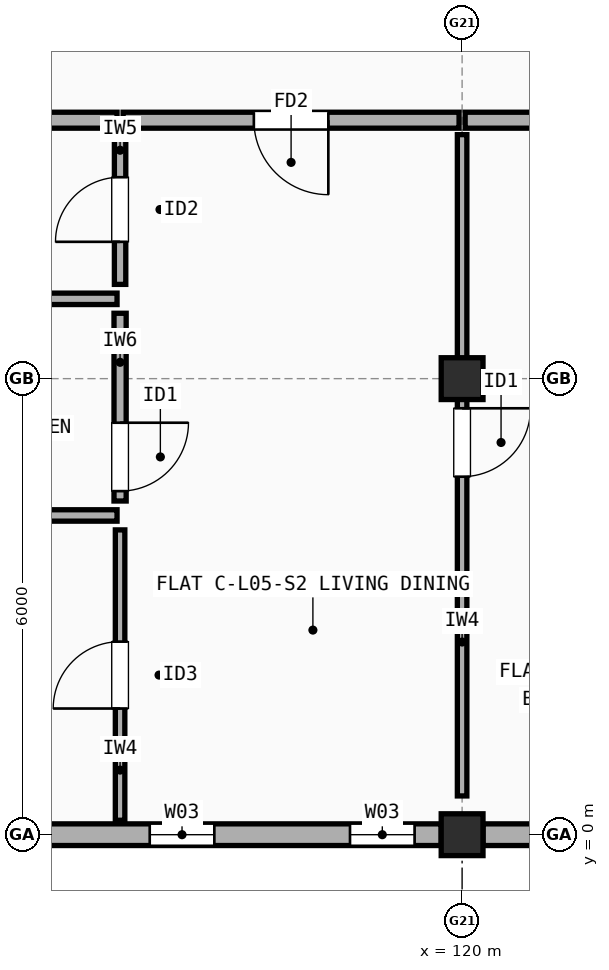
"""IFC4 building model, lengths in metres.
Left out: names, types, materials, properties, quantities, classifications, styles, units other than length and angle.
Written with IfcOpenShell. Run it as: python <this file> out.ifc"""

import sys

from ifc_helpers import new_model, si_unit, direction, frame, frame_2d, origin, origin_2d, place, context, subcontext, project, spatial, rectangle, extrude, element, fill, save


model = new_model("IFC4")
c1 = context("Model", 3, precision=1e-05, world=origin(), true_north=direction((0.0, 1.0)))
c2 = subcontext(c1, "Body", "Model", "MODEL_VIEW")
j1 = project(units=[si_unit("LENGTHUNIT", "METRE"), si_unit("PLANEANGLEUNIT", "RADIAN")], contexts=[c1])
p1 = place(None, origin())
s1 = spatial("IfcSite", under=j1, at=p1, CompositionType="ELEMENT")
p2 = place(p1, origin())
s2 = spatial("IfcBuilding", under=s1, at=p2, CompositionType="ELEMENT")
p3 = place(p2, frame((0.0, 0.0, 17.3)))
s3 = spatial("IfcBuildingStorey", under=s2, at=p3, CompositionType="ELEMENT", Elevation=17.3)
for number, where, z_axis, x_axis in (
    (1, (120.0, 0.0, 0.0), (0.0, 0.0, 1.0), (1.0, 0.0, 0.0)),
    (2, (120.0, 6.0, 0.0), (0.0, 0.0, 1.0), (1.0, 0.0, 0.0)),
):
    element("IfcColumn", number, at=place(p3, frame(where, z_axis=z_axis, x_axis=x_axis)), inside=s3, PredefinedType="COLUMN", context=c2, shape_type="SweptSolid", body=[
        extrude(rectangle(XDim=0.55, YDim=0.55, at=origin_2d()), origin(), (0.0, 0.0, 1.0), 2.965),
    ])
p4 = place(p3, frame((114.275, 0.0, 0.0), z_axis=(0.0, 0.0, 1.0), x_axis=(1.0, 0.0, 0.0)))
e3 = element("IfcWall", 3, at=p4, inside=s3, PredefinedType="STANDARD", context=c2, shape_type="SweptSolid", body=[
    extrude(rectangle(XDim=5.45, YDim=0.285, at=frame_2d((2.725, 0.0))), origin(), (0.0, 0.0, 1.0), 2.447),
])
p5 = place(p4, frame((1.615, 0.0, 0.9)))
e4 = element("IfcOpeningElement", 4, at=p5, cuts=e3, PredefinedType="OPENING", context=c2, shape_type="SweptSolid", body=[
    extrude(rectangle(XDim=0.85, YDim=1.25, at=frame_2d((0.425, 0.625))), frame((0.0, 0.152, 0.0), z_axis=(0.0, -1.0, 0.0), x_axis=(1.0, 0.0, 0.0)), (0.0, 0.0, 1.0), 0.305),
])
p6 = place(p4, frame((4.25, 0.0, 0.9)))
e5 = element("IfcOpeningElement", 5, at=p6, cuts=e3, PredefinedType="OPENING", context=c2, shape_type="SweptSolid", body=[
    extrude(rectangle(XDim=0.85, YDim=1.25, at=frame_2d((0.425, 0.625))), frame((0.0, 0.152, 0.0), z_axis=(0.0, -1.0, 0.0), x_axis=(1.0, 0.0, 0.0)), (0.0, 0.0, 1.0), 0.305),
])
p7 = place(p3, frame((120.275, 0.0, 0.0), z_axis=(0.0, 0.0, 1.0), x_axis=(1.0, 0.0, 0.0)))
e6 = element("IfcWall", 6, at=p7, inside=s3, PredefinedType="STANDARD", context=c2, shape_type="SweptSolid", body=[
    extrude(rectangle(XDim=5.45, YDim=0.285, at=frame_2d((2.725, 0.0))), origin(), (0.0, 0.0, 1.0), 2.447),
])
p8 = place(p7, frame((0.867, 0.0, 0.9)))
e7 = element("IfcOpeningElement", 7, at=p8, cuts=e6, PredefinedType="OPENING", context=c2, shape_type="SweptSolid", body=[
    extrude(rectangle(XDim=0.95, YDim=1.35, at=frame_2d((0.475, 0.675))), frame((0.0, 0.152, 0.0), z_axis=(0.0, -1.0, 0.0), x_axis=(1.0, 0.0, 0.0)), (0.0, 0.0, 1.0), 0.305),
])
p9 = place(p7, frame((3.583, 0.0, 0.9)))
e8 = element("IfcOpeningElement", 8, at=p9, cuts=e6, PredefinedType="OPENING", context=c2, shape_type="SweptSolid", body=[
    extrude(rectangle(XDim=1.05, YDim=1.35, at=frame_2d((0.525, 0.675))), frame((0.0, 0.152, 0.0), z_axis=(0.0, -1.0, 0.0), x_axis=(1.0, 0.0, 0.0)), (0.0, 0.0, 1.0), 0.305),
])
p10 = place(p3, frame((111.04, 9.4, 0.0), z_axis=(0.0, 0.0, 1.0), x_axis=(1.0, 0.0, 0.0)))
e9 = element("IfcWall", 9, at=p10, inside=s3, PredefinedType="SOLIDWALL", context=c2, shape_type="SweptSolid", body=[
    extrude(rectangle(XDim=4.42, YDim=0.21, at=frame_2d((2.21, 0.0))), origin(), (0.0, 0.0, 1.0), 2.548),
])
p11 = place(p3, frame((115.54, 9.4, 0.0), z_axis=(0.0, 0.0, 1.0), x_axis=(1.0, 0.0, 0.0)))
e10 = element("IfcWall", 10, at=p11, inside=s3, PredefinedType="SOLIDWALL", context=c2, shape_type="SweptSolid", body=[
    extrude(rectangle(XDim=4.42, YDim=0.21, at=frame_2d((2.21, 0.0))), origin(), (0.0, 0.0, 1.0), 2.458),
])
p12 = place(p11, frame((1.72, 0.0, 0.0)))
e11 = element("IfcOpeningElement", 11, at=p12, cuts=e10, PredefinedType="OPENING", context=c2, shape_type="SweptSolid", body=[
    extrude(rectangle(XDim=0.98, YDim=2.15, at=frame_2d((0.49, 1.075))), frame((0.0, 0.115, 0.0), z_axis=(0.0, -1.0, 0.0), x_axis=(1.0, 0.0, 0.0)), (0.0, 0.0, 1.0), 0.23),
])
p13 = place(p3, frame((115.5, 0.19, 0.0), z_axis=(0.0, 0.0, 1.0), x_axis=(0.0, 1.0, 0.0)))
e12 = element("IfcWall", 12, at=p13, inside=s3, PredefinedType="PARTITIONING", context=c2, shape_type="SweptSolid", body=[
    extrude(rectangle(XDim=3.82, YDim=0.125, at=frame_2d((1.91, 0.0))), origin(), (0.0, 0.0, 1.0), 2.965),
])
p14 = place(p13, frame((1.47, 0.0, 0.0)))
e13 = element("IfcOpeningElement", 13, at=p14, cuts=e12, PredefinedType="OPENING", context=c2, shape_type="SweptSolid", body=[
    extrude(rectangle(XDim=0.88, YDim=2.1, at=frame_2d((0.44, 1.05))), frame((0.0, 0.073, 0.0), z_axis=(0.0, -1.0, 0.0), x_axis=(1.0, 0.0, 0.0)), (0.0, 0.0, 1.0), 0.145),
])
p15 = place(p3, frame((115.5, 4.39, 0.0), z_axis=(0.0, 0.0, 1.0), x_axis=(0.0, 1.0, 0.0)))
e14 = element("IfcWall", 14, at=p15, inside=s3, PredefinedType="PLUMBINGWALL", context=c2, shape_type="SweptSolid", body=[
    extrude(rectangle(XDim=2.47, YDim=0.16, at=frame_2d((1.235, 0.0))), origin(), (0.0, 0.0, 1.0), 2.447),
])
p16 = place(p15, frame((0.13, 0.0, 0.0)))
e15 = element("IfcOpeningElement", 15, at=p16, cuts=e14, PredefinedType="OPENING", context=c2, shape_type="SweptSolid", body=[
    extrude(rectangle(XDim=0.9, YDim=2.1, at=frame_2d((0.45, 1.05))), frame((0.0, 0.09, 0.0), z_axis=(0.0, -1.0, 0.0), x_axis=(1.0, 0.0, 0.0)), (0.0, 0.0, 1.0), 0.18),
])
p17 = place(p3, frame((115.5, 7.24, 0.0), z_axis=(0.0, 0.0, 1.0), x_axis=(0.0, 1.0, 0.0)))
e16 = element("IfcWall", 16, at=p17, inside=s3, PredefinedType="PARTITIONING", context=c2, shape_type="SweptSolid", body=[
    extrude(rectangle(XDim=1.97, YDim=0.15, at=frame_2d((0.985, 0.0))), origin(), (0.0, 0.0, 1.0), 2.965),
])
p18 = place(p17, frame((0.56, 0.0, 0.0)))
e17 = element("IfcOpeningElement", 17, at=p18, cuts=e16, PredefinedType="OPENING", context=c2, shape_type="SweptSolid", body=[
    extrude(rectangle(XDim=0.85, YDim=2.1, at=frame_2d((0.425, 1.05))), frame((0.0, 0.085, 0.0), z_axis=(0.0, -1.0, 0.0), x_axis=(1.0, 0.0, 0.0)), (0.0, 0.0, 1.0), 0.17),
])
p19 = place(p3, frame((111.04, 4.2, 0.0), z_axis=(0.0, 0.0, 1.0), x_axis=(1.0, 0.0, 0.0)))
e18 = element("IfcWall", 18, at=p19, inside=s3, PredefinedType="PARTITIONING", context=c2, shape_type="SweptSolid", body=[
    extrude(rectangle(XDim=4.42, YDim=0.15, at=frame_2d((2.21, 0.0))), origin(), (0.0, 0.0, 1.0), 2.458),
])
p20 = place(p3, frame((111.04, 7.05, 0.0), z_axis=(0.0, 0.0, 1.0), x_axis=(1.0, 0.0, 0.0)))
e19 = element("IfcWall", 19, at=p20, inside=s3, PredefinedType="PARTITIONING", context=c2, shape_type="SweptSolid", body=[
    extrude(rectangle(XDim=4.42, YDim=0.15, at=frame_2d((2.21, 0.0))), origin(), (0.0, 0.0, 1.0), 2.548),
])
p21 = place(p3, frame((120.04, 9.4, 0.0), z_axis=(0.0, 0.0, 1.0), x_axis=(1.0, 0.0, 0.0)))
e20 = element("IfcWall", 20, at=p21, inside=s3, PredefinedType="SOLIDWALL", context=c2, shape_type="SweptSolid", body=[
    extrude(rectangle(XDim=2.92, YDim=0.21, at=frame_2d((1.46, 0.0))), origin(), (0.0, 0.0, 1.0), 2.458),
])
p22 = place(p3, frame((120.0, 0.51, 0.0), z_axis=(0.0, 0.0, 1.0), x_axis=(0.0, 1.0, 0.0)))
e21 = element("IfcWall", 21, at=p22, inside=s3, PredefinedType="PARTITIONING", context=c2, shape_type="SweptSolid", body=[
    extrude(rectangle(XDim=8.7, YDim=0.125, at=frame_2d((4.35, 0.0))), origin(), (0.0, 0.0, 1.0), 2.458),
])
p23 = place(p22, frame((4.2, 0.0, 0.0)))
e22 = element("IfcOpeningElement", 22, at=p23, cuts=e21, PredefinedType="OPENING", context=c2, shape_type="SweptSolid", body=[
    extrude(rectangle(XDim=0.9, YDim=2.1, at=frame_2d((0.45, 1.05))), frame((0.0, 0.073, 0.0), z_axis=(0.0, -1.0, 0.0), x_axis=(1.0, 0.0, 0.0)), (0.0, 0.0, 1.0), 0.145),
])
p24 = place(p5, origin())
e23 = element("IfcWindow", 23, at=p24, inside=s3, PartitioningType="SINGLE_PANEL", PredefinedType="WINDOW", context=c2, shape_type="SweptSolid", body=[
    extrude(rectangle(XDim=0.85, YDim=1.25, at=frame_2d((0.425, 0.625))), frame((0.0, 0.03, 0.0), z_axis=(0.0, -1.0, 0.0), x_axis=(1.0, 0.0, 0.0)), (0.0, 0.0, 1.0), 0.06),
])
fill(e4, e23)
p25 = place(p6, origin())
e24 = element("IfcWindow", 24, at=p25, inside=s3, PartitioningType="SINGLE_PANEL", PredefinedType="WINDOW", context=c2, shape_type="SweptSolid", body=[
    extrude(rectangle(XDim=0.85, YDim=1.25, at=frame_2d((0.425, 0.625))), frame((0.0, 0.03, 0.0), z_axis=(0.0, -1.0, 0.0), x_axis=(1.0, 0.0, 0.0)), (0.0, 0.0, 1.0), 0.06),
])
fill(e5, e24)
p26 = place(p12, origin())
e25 = element("IfcDoor", 25, at=p26, inside=s3, OperationType="SINGLE_SWING_RIGHT", PredefinedType="DOOR", context=c2, shape_type="SweptSolid", body=[
    extrude(rectangle(XDim=0.98, YDim=2.15, at=frame_2d((0.49, 1.075))), frame((0.0, 0.025, 0.0), z_axis=(0.0, -1.0, 0.0), x_axis=(1.0, 0.0, 0.0)), (0.0, 0.0, 1.0), 0.05),
])
fill(e11, e25)
p27 = place(p14, origin())
e26 = element("IfcDoor", 26, at=p27, inside=s3, OperationType="SINGLE_SWING_LEFT", PredefinedType="DOOR", context=c2, shape_type="SweptSolid", body=[
    extrude(rectangle(XDim=0.88, YDim=2.1, at=frame_2d((0.44, 1.05))), frame((0.0, 0.025, 0.0), z_axis=(0.0, -1.0, 0.0), x_axis=(1.0, 0.0, 0.0)), (0.0, 0.0, 1.0), 0.05),
])
fill(e13, e26)
p28 = place(p16, origin())
e27 = element("IfcDoor", 27, at=p28, inside=s3, OperationType="SINGLE_SWING_RIGHT", PredefinedType="DOOR", context=c2, shape_type="SweptSolid", body=[
    extrude(rectangle(XDim=0.9, YDim=2.1, at=frame_2d((0.45, 1.05))), frame((0.0, 0.025, 0.0), z_axis=(0.0, -1.0, 0.0), x_axis=(1.0, 0.0, 0.0)), (0.0, 0.0, 1.0), 0.05),
])
fill(e15, e27)
p29 = place(p18, origin())
e28 = element("IfcDoor", 28, at=p29, inside=s3, OperationType="SINGLE_SWING_LEFT", PredefinedType="DOOR", context=c2, shape_type="SweptSolid", body=[
    extrude(rectangle(XDim=0.85, YDim=2.1, at=frame_2d((0.425, 1.05))), frame((0.0, 0.025, 0.0), z_axis=(0.0, -1.0, 0.0), x_axis=(1.0, 0.0, 0.0)), (0.0, 0.0, 1.0), 0.05),
])
fill(e17, e28)
p30 = place(p23, origin())
e29 = element("IfcDoor", 29, at=p30, inside=s3, OperationType="SINGLE_SWING_RIGHT", PredefinedType="DOOR", context=c2, shape_type="SweptSolid", body=[
    extrude(rectangle(XDim=0.9, YDim=2.1, at=frame_2d((0.45, 1.05))), frame((0.0, 0.025, 0.0), z_axis=(0.0, -1.0, 0.0), x_axis=(1.0, 0.0, 0.0)), (0.0, 0.0, 1.0), 0.05),
])
fill(e22, e29)
save(model, sys.argv[1])
